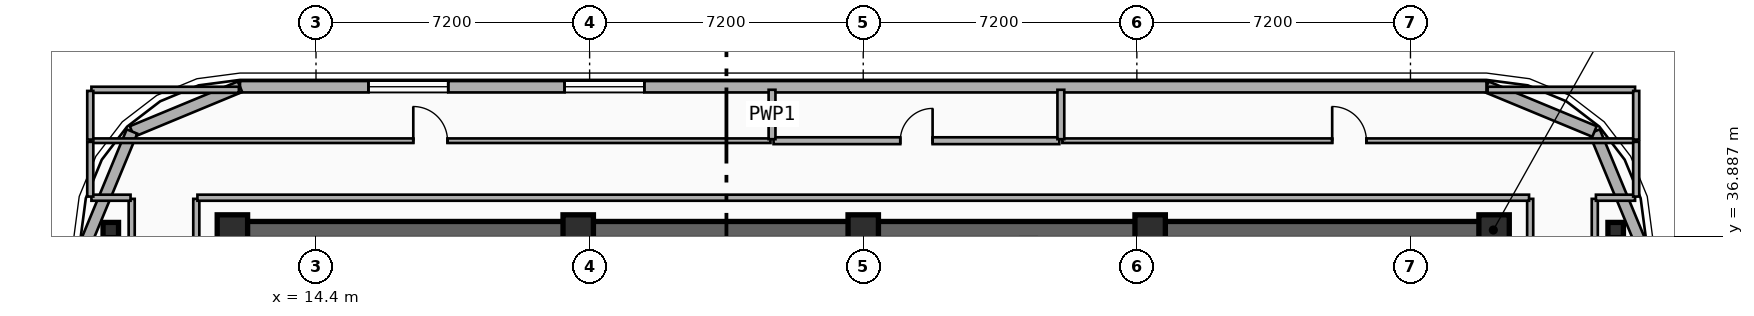
"""IFC4 building model, lengths in metres.
Left out: names, types, materials, properties, quantities, classifications, styles, units other than length and angle.
Written with IfcOpenShell. Run it as: python <this file> out.ifc"""

import sys

from ifc_helpers import new_model, si_unit, direction, frame, frame_2d, origin, origin_2d, place, context, subcontext, project, spatial, rectangle, i_section, extrude, element, fill, save


model = new_model("IFC4")
c1 = context("Model", 3, precision=1e-05, world=origin(), true_north=direction((0.0, 1.0)))
c2 = subcontext(c1, "Body", "Model", "MODEL_VIEW")
j1 = project(units=[si_unit("LENGTHUNIT", "METRE"), si_unit("PLANEANGLEUNIT", "RADIAN")], contexts=[c1])
p1 = place(None, origin())
s1 = spatial("IfcSite", under=j1, at=p1, CompositionType="ELEMENT")
p2 = place(p1, origin())
s2 = spatial("IfcBuilding", under=s1, at=p2, CompositionType="ELEMENT")
p3 = place(p2, frame((0.0, 0.0, 276.9)))
s3 = spatial("IfcBuildingStorey", under=s2, at=p3, CompositionType="ELEMENT", Elevation=276.9)
p4 = place(p3, frame((12.15, 37.05, 0.0), z_axis=(0.0, 0.0, 1.0), x_axis=(1.0, 0.0, 0.0)))
e1 = element("IfcWall", 1, at=p4, inside=s3, PredefinedType="SHEAR", context=c2, shape_type="SweptSolid", body=[
    extrude(rectangle(XDim=33.23, YDim=0.45, at=frame_2d((16.615, 0.0))), origin(), (0.0, 0.0, 1.0), 3.7),
])
for number, where, z_axis, x_axis in (
    (2, (12.2, 37.05, 0.0), (0.0, 0.0, 1.0), (1.0, 0.0, 0.0)),
    (3, (21.3, 37.05, 0.0), (0.0, 0.0, 1.0), (1.0, 0.0, 0.0)),
    (4, (28.8, 37.05, 0.0), (0.0, 0.0, 1.0), (1.0, 0.0, 0.0)),
    (5, (36.35, 37.05, 0.0), (0.0, 0.0, 1.0), (1.0, 0.0, 0.0)),
    (6, (45.4, 37.05, 0.0), (0.0, 0.0, 1.0), (1.0, 0.0, 0.0)),
):
    element("IfcColumn", number, at=place(p3, frame(where, z_axis=z_axis, x_axis=x_axis)), inside=s3, PredefinedType="COLUMN", context=c2, shape_type="SweptSolid", body=[
        extrude(rectangle(XDim=0.8, YDim=0.8, at=origin_2d()), origin(), (0.0, 0.0, 1.0), 3.7),
    ])
for number, where, z_axis, x_axis in (
    (7, (9.0, 37.05, 0.0), (0.0, 0.0, 1.0), (1.0, 0.0, 0.0)),
    (8, (48.6, 37.05, 0.0), (0.0, 0.0, 1.0), (1.0, 0.0, 0.0)),
):
    element("IfcColumn", number, at=place(p3, frame(where, z_axis=z_axis, x_axis=x_axis)), inside=s3, PredefinedType="COLUMN", context=c2, shape_type="SweptSolid", body=[
        extrude(i_section(OverallWidth=0.408, OverallDepth=0.4, WebThickness=0.025, FlangeThickness=0.039, FilletRadius=0.015, at=origin_2d()), origin(), (0.0, 0.0, 1.0), 3.7),
    ])
for number, where, z_axis, x_axis in (
    (9, (48.042, 39.643, 0.0), (0.0, 0.0, 1.0), (0.383, -0.924, 0.0)),
    (10, (45.2, 40.82, 0.0), (0.0, 0.0, 1.0), (0.924, -0.383, 0.0)),
):
    element("IfcWall", number, at=place(p3, frame(where, z_axis=z_axis, x_axis=x_axis)), inside=s3, PredefinedType="SOLIDWALL", context=c2, shape_type="SweptSolid", body=[
        extrude(rectangle(XDim=3.077, YDim=0.3, at=frame_2d((1.538, 0.0))), origin(), (0.0, 0.0, 1.0), 3.38),
    ])
p5 = place(p3, frame((12.4, 40.82, 0.0), z_axis=(0.0, 0.0, 1.0), x_axis=(1.0, 0.0, 0.0)))
e11 = element("IfcWall", 11, at=p5, inside=s3, PredefinedType="SOLIDWALL", context=c2, shape_type="SweptSolid", body=[
    extrude(rectangle(XDim=32.8, YDim=0.3, at=frame_2d((16.4, 0.0))), origin(), (0.0, 0.0, 1.0), 3.38),
])
p6 = place(p5, frame((3.38, 0.0, 0.75)))
e12 = element("IfcOpeningElement", 12, at=p6, cuts=e11, PredefinedType="OPENING", context=c2, shape_type="SweptSolid", body=[
    extrude(rectangle(XDim=2.1, YDim=2.1, at=frame_2d((1.05, 1.05))), frame((0.0, 0.16, 0.0), z_axis=(0.0, -1.0, 0.0), x_axis=(1.0, 0.0, 0.0)), (0.0, 0.0, 1.0), 0.32),
])
p7 = place(p5, frame((8.54, 0.0, 0.75)))
e13 = element("IfcOpeningElement", 13, at=p7, cuts=e11, PredefinedType="OPENING", context=c2, shape_type="SweptSolid", body=[
    extrude(rectangle(XDim=2.1, YDim=2.1, at=frame_2d((1.05, 1.05))), frame((0.0, 0.16, 0.0), z_axis=(0.0, -1.0, 0.0), x_axis=(1.0, 0.0, 0.0)), (0.0, 0.0, 1.0), 0.32),
])
for number, where, z_axis, x_axis in (
    (14, (9.557, 39.643, 0.0), (0.0, 0.0, 1.0), (0.924, 0.383, 0.0)),
    (15, (8.38, 36.8, 0.0), (0.0, 0.0, 1.0), (0.383, 0.924, 0.0)),
):
    element("IfcWall", number, at=place(p3, frame(where, z_axis=z_axis, x_axis=x_axis)), inside=s3, PredefinedType="SOLIDWALL", context=c2, shape_type="SweptSolid", body=[
        extrude(rectangle(XDim=3.077, YDim=0.3, at=frame_2d((1.538, 0.0))), origin(), (0.0, 0.0, 1.0), 3.38),
    ])
p8 = place(p3, frame((8.46, 39.4, 0.0), z_axis=(0.0, 0.0, 1.0), x_axis=(1.0, 0.0, 0.0)))
e16 = element("IfcWall", 16, at=p8, inside=s3, PredefinedType="PARTITIONING", context=c2, shape_type="SweptSolid", body=[
    extrude(rectangle(XDim=17.9, YDim=0.12, at=frame_2d((8.95, 0.0))), origin(), (0.0, 0.0, 1.0), 3.38),
])
p9 = place(p8, frame((8.5, 0.0, 0.0)))
e17 = element("IfcOpeningElement", 17, at=p9, cuts=e16, PredefinedType="OPENING", context=c2, shape_type="SweptSolid", body=[
    extrude(rectangle(XDim=0.9, YDim=2.1, at=frame_2d((0.45, 1.05))), frame((0.0, 0.07, 0.0), z_axis=(0.0, -1.0, 0.0), x_axis=(1.0, 0.0, 0.0)), (0.0, 0.0, 1.0), 0.14),
])
p10 = place(p3, frame((26.44, 39.4, 0.0), z_axis=(0.0, 0.0, 1.0), x_axis=(1.0, 0.0, 0.0)))
e18 = element("IfcWall", 18, at=p10, inside=s3, PredefinedType="PLUMBINGWALL", context=c2, shape_type="SweptSolid", body=[
    extrude(rectangle(XDim=7.52, YDim=0.18, at=frame_2d((3.76, 0.0))), origin(), (0.0, 0.0, 1.0), 3.38),
])
p11 = place(p10, frame((3.335, 0.0, 0.0)))
e19 = element("IfcOpeningElement", 19, at=p11, cuts=e18, PredefinedType="OPENING", context=c2, shape_type="SweptSolid", body=[
    extrude(rectangle(XDim=0.85, YDim=2.1, at=frame_2d((0.425, 1.05))), frame((0.0, 0.1, 0.0), z_axis=(0.0, -1.0, 0.0), x_axis=(1.0, 0.0, 0.0)), (0.0, 0.0, 1.0), 0.2),
])
p12 = place(p3, frame((34.04, 39.4, 0.0), z_axis=(0.0, 0.0, 1.0), x_axis=(1.0, 0.0, 0.0)))
e20 = element("IfcWall", 20, at=p12, inside=s3, PredefinedType="PARTITIONING", context=c2, shape_type="SweptSolid", body=[
    extrude(rectangle(XDim=15.1, YDim=0.12, at=frame_2d((7.55, 0.0))), origin(), (0.0, 0.0, 1.0), 3.38),
])
p13 = place(p12, frame((7.1, 0.0, 0.0)))
e21 = element("IfcOpeningElement", 21, at=p13, cuts=e20, PredefinedType="OPENING", context=c2, shape_type="SweptSolid", body=[
    extrude(rectangle(XDim=0.9, YDim=2.1, at=frame_2d((0.45, 1.05))), frame((0.0, 0.07, 0.0), z_axis=(0.0, -1.0, 0.0), x_axis=(1.0, 0.0, 0.0)), (0.0, 0.0, 1.0), 0.14),
])
for number, where, z_axis, x_axis in (
    (22, (26.4, 39.44, 0.0), (0.0, 0.0, 1.0), (0.0, 1.0, 0.0)),
    (23, (34.0, 39.44, 0.0), (0.0, 0.0, 1.0), (0.0, 1.0, 0.0)),
):
    element("IfcWall", number, at=place(p3, frame(where, z_axis=z_axis, x_axis=x_axis)), inside=s3, PredefinedType="PLUMBINGWALL", context=c2, shape_type="SweptSolid", body=[
        extrude(rectangle(XDim=1.3, YDim=0.18, at=frame_2d((0.65, 0.0))), origin(), (0.0, 0.0, 1.0), 3.38),
    ])
for number, where, z_axis, x_axis in (
    (24, (9.55, 27.63, 0.0), (0.0, 0.0, 1.0), (0.0, 1.0, 0.0)),
    (25, (11.25, 27.63, 0.0), (0.0, 0.0, 1.0), (0.0, 1.0, 0.0)),
    (26, (46.35, 27.63, 0.0), (0.0, 0.0, 1.0), (0.0, 1.0, 0.0)),
    (27, (48.05, 27.63, 0.0), (0.0, 0.0, 1.0), (0.0, 1.0, 0.0)),
):
    element("IfcWall", number, at=place(p3, frame(where, z_axis=z_axis, x_axis=x_axis)), inside=s3, PredefinedType="PARTITIONING", context=c2, shape_type="SweptSolid", body=[
        extrude(rectangle(XDim=10.24, YDim=0.16, at=frame_2d((5.12, 0.0))), origin(), (0.0, 0.0, 1.0), 2.86),
    ])
p14 = place(p3, frame((8.49, 37.9, 0.0), z_axis=(0.0, 0.0, 1.0), x_axis=(1.0, 0.0, 0.0)))
e28 = element("IfcWall", 28, at=p14, inside=s3, PredefinedType="PARTITIONING", context=c2, shape_type="SweptSolid", body=[
    extrude(rectangle(XDim=1.03, YDim=0.16, at=frame_2d((0.515, 0.0))), origin(), (0.0, 0.0, 1.0), 3.38),
])
p15 = place(p3, frame((11.28, 37.9, 0.0), z_axis=(0.0, 0.0, 1.0), x_axis=(1.0, 0.0, 0.0)))
e29 = element("IfcWall", 29, at=p15, inside=s3, PredefinedType="PARTITIONING", context=c2, shape_type="SweptSolid", body=[
    extrude(rectangle(XDim=35.04, YDim=0.16, at=frame_2d((17.52, 0.0))), origin(), (0.0, 0.0, 1.0), 3.38),
])
p16 = place(p3, frame((48.08, 37.9, 0.0), z_axis=(0.0, 0.0, 1.0), x_axis=(1.0, 0.0, 0.0)))
e30 = element("IfcWall", 30, at=p16, inside=s3, PredefinedType="PARTITIONING", context=c2, shape_type="SweptSolid", body=[
    extrude(rectangle(XDim=1.03, YDim=0.16, at=frame_2d((0.515, 0.0))), origin(), (0.0, 0.0, 1.0), 3.38),
])
for number, where, z_axis, x_axis in (
    (31, (8.46, 37.93, 0.0), (0.0, 0.0, 1.0), (0.0, 1.0, 0.0)),
    (32, (49.14, 37.93, 0.0), (0.0, 0.0, 1.0), (0.0, 1.0, 0.0)),
):
    element("IfcWall", number, at=place(p3, frame(where, z_axis=z_axis, x_axis=x_axis)), inside=s3, PredefinedType="PARTITIONING", context=c2, shape_type="SweptSolid", body=[
        extrude(rectangle(XDim=1.44, YDim=0.16, at=frame_2d((0.72, 0.0))), origin(), (0.0, 0.0, 1.0), 3.38),
    ])
p17 = place(p3, frame((8.49, 40.74, 0.0), z_axis=(0.0, 0.0, 1.0), x_axis=(1.0, 0.0, 0.0)))
e33 = element("IfcWall", 33, at=p17, inside=s3, PredefinedType="PARTITIONING", context=c2, shape_type="SweptSolid", body=[
    extrude(rectangle(XDim=3.88, YDim=0.16, at=frame_2d((1.94, 0.0))), origin(), (0.0, 0.0, 1.0), 3.38),
])
p18 = place(p3, frame((8.46, 39.43, 0.0), z_axis=(0.0, 0.0, 1.0), x_axis=(0.0, 1.0, 0.0)))
e34 = element("IfcWall", 34, at=p18, inside=s3, PredefinedType="PARTITIONING", context=c2, shape_type="SweptSolid", body=[
    extrude(rectangle(XDim=1.28, YDim=0.16, at=frame_2d((0.64, 0.0))), origin(), (0.0, 0.0, 1.0), 3.38),
])
p19 = place(p3, frame((45.23, 40.74, 0.0), z_axis=(0.0, 0.0, 1.0), x_axis=(1.0, 0.0, 0.0)))
e35 = element("IfcWall", 35, at=p19, inside=s3, PredefinedType="PARTITIONING", context=c2, shape_type="SweptSolid", body=[
    extrude(rectangle(XDim=3.88, YDim=0.16, at=frame_2d((1.94, 0.0))), origin(), (0.0, 0.0, 1.0), 3.38),
])
p20 = place(p3, frame((49.14, 39.43, 0.0), z_axis=(0.0, 0.0, 1.0), x_axis=(0.0, 1.0, 0.0)))
e36 = element("IfcWall", 36, at=p20, inside=s3, PredefinedType="PARTITIONING", context=c2, shape_type="SweptSolid", body=[
    extrude(rectangle(XDim=1.28, YDim=0.16, at=frame_2d((0.64, 0.0))), origin(), (0.0, 0.0, 1.0), 3.38),
])
p21 = place(p6, origin())
e37 = element("IfcWindow", 37, at=p21, inside=s3, PartitioningType="SINGLE_PANEL", PredefinedType="WINDOW", context=c2, shape_type="SweptSolid", body=[
    extrude(rectangle(XDim=2.1, YDim=2.1, at=frame_2d((1.05, 1.05))), frame((0.0, 0.03, 0.0), z_axis=(0.0, -1.0, 0.0), x_axis=(1.0, 0.0, 0.0)), (0.0, 0.0, 1.0), 0.06),
])
fill(e12, e37)
p22 = place(p7, origin())
e38 = element("IfcWindow", 38, at=p22, inside=s3, PartitioningType="SINGLE_PANEL", PredefinedType="WINDOW", context=c2, shape_type="SweptSolid", body=[
    extrude(rectangle(XDim=2.1, YDim=2.1, at=frame_2d((1.05, 1.05))), frame((0.0, 0.03, 0.0), z_axis=(0.0, -1.0, 0.0), x_axis=(1.0, 0.0, 0.0)), (0.0, 0.0, 1.0), 0.06),
])
fill(e13, e38)
p23 = place(p9, origin())
e39 = element("IfcDoor", 39, at=p23, inside=s3, OperationType="SINGLE_SWING_LEFT", PredefinedType="DOOR", context=c2, shape_type="SweptSolid", body=[
    extrude(rectangle(XDim=0.9, YDim=2.1, at=frame_2d((0.45, 1.05))), frame((0.0, 0.025, 0.0), z_axis=(0.0, -1.0, 0.0), x_axis=(1.0, 0.0, 0.0)), (0.0, 0.0, 1.0), 0.05),
])
fill(e17, e39)
p24 = place(p11, origin())
e40 = element("IfcDoor", 40, at=p24, inside=s3, OperationType="SINGLE_SWING_RIGHT", PredefinedType="DOOR", context=c2, shape_type="SweptSolid", body=[
    extrude(rectangle(XDim=0.85, YDim=2.1, at=frame_2d((0.425, 1.05))), frame((0.0, 0.025, 0.0), z_axis=(0.0, -1.0, 0.0), x_axis=(1.0, 0.0, 0.0)), (0.0, 0.0, 1.0), 0.05),
])
fill(e19, e40)
p25 = place(p13, origin())
e41 = element("IfcDoor", 41, at=p25, inside=s3, OperationType="SINGLE_SWING_LEFT", PredefinedType="DOOR", context=c2, shape_type="SweptSolid", body=[
    extrude(rectangle(XDim=0.9, YDim=2.1, at=frame_2d((0.45, 1.05))), frame((0.0, 0.025, 0.0), z_axis=(0.0, -1.0, 0.0), x_axis=(1.0, 0.0, 0.0)), (0.0, 0.0, 1.0), 0.05),
])
fill(e21, e41)
save(model, sys.argv[1])
